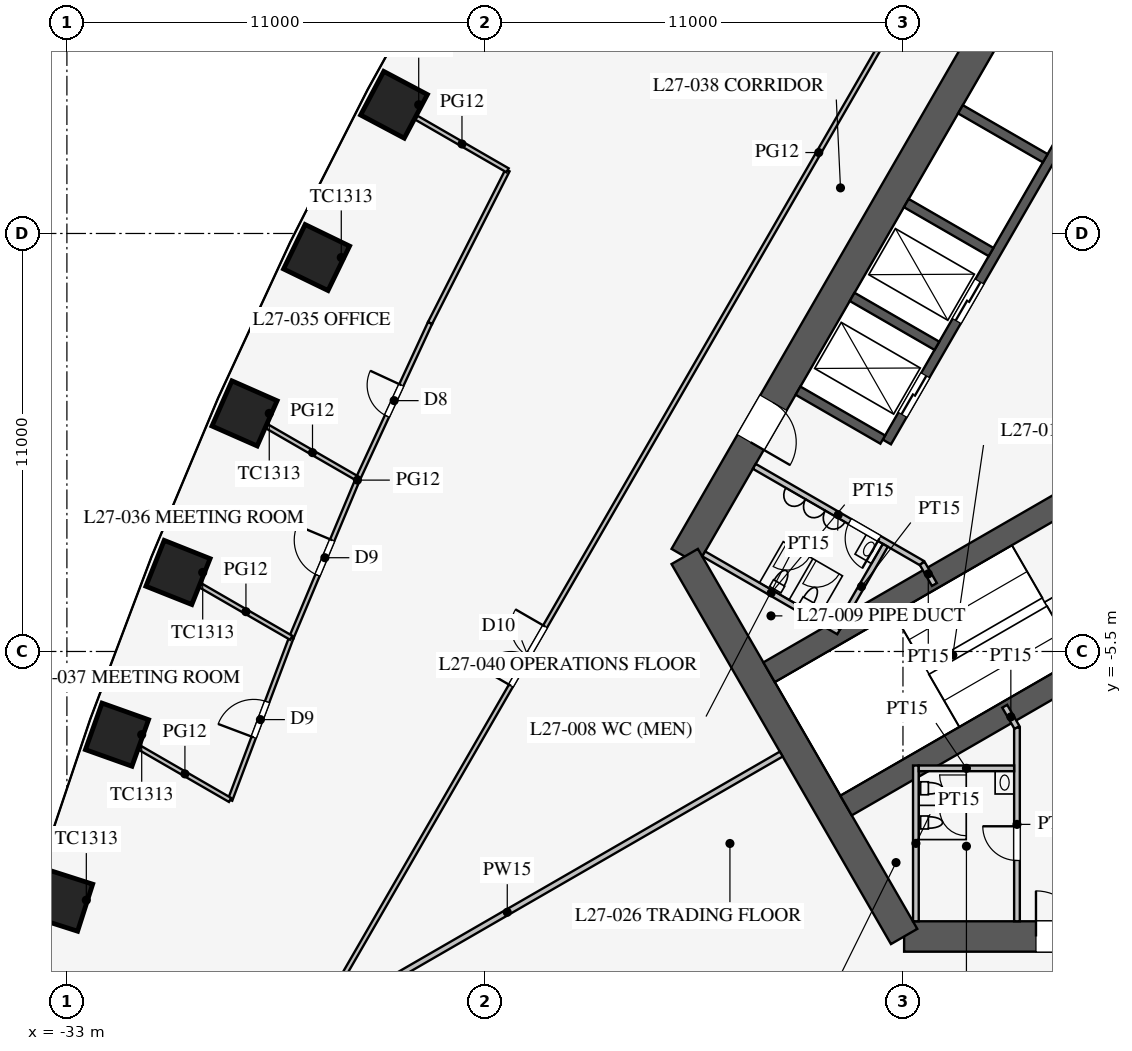
"""IFC4 building model, lengths in metres.
Left out: names, types, materials, properties, quantities, classifications, styles, units other than length and angle.
Written with IfcOpenShell. Run it as: python <this file> out.ifc"""

import sys

from ifc_helpers import new_model, si_unit, direction, frame, frame_2d, origin, origin_2d, place, context, subcontext, project, spatial, rectangle, extrude, element, fill, save


model = new_model("IFC4")
c1 = context("Model", 3, precision=1e-05, world=origin(), true_north=direction((0.0, 1.0)))
c2 = subcontext(c1, "Body", "Model", "MODEL_VIEW")
j1 = project(units=[si_unit("LENGTHUNIT", "METRE"), si_unit("PLANEANGLEUNIT", "RADIAN")], contexts=[c1])
p1 = place(None, origin())
s1 = spatial("IfcSite", under=j1, at=p1, CompositionType="ELEMENT")
p2 = place(p1, origin())
s2 = spatial("IfcBuilding", under=s1, at=p2, CompositionType="ELEMENT")
p3 = place(p2, frame((0.0, 0.0, 119.9)))
s3 = spatial("IfcBuildingStorey", under=s2, at=p3, CompositionType="ELEMENT", Elevation=119.9)
for number, where, z_axis, x_axis in (
    (1, (-24.393, 8.887, 0.0), (0.0, 0.0, 1.0), (-0.468, -0.883, 0.0)),
    (2, (-26.43, 4.867, 0.0), (0.0, 0.0, 1.0), (-0.436, -0.9, 0.0)),
    (3, (-28.325, 0.765, 0.0), (0.0, 0.0, 1.0), (-0.403, -0.915, 0.0)),
    (4, (-30.077, -3.42, 0.0), (0.0, 0.0, 1.0), (-0.37, -0.929, 0.0)),
    (5, (-31.682, -7.689, 0.0), (0.0, 0.0, 1.0), (-0.336, -0.942, 0.0)),
    (6, (-33.139, -12.044, 0.0), (0.0, 0.0, 1.0), (-0.305, -0.952, 0.0)),
):
    element("IfcColumn", number, at=place(p3, frame(where, z_axis=z_axis, x_axis=x_axis)), inside=s3, PredefinedType="COLUMN", context=c2, shape_type="SweptSolid", body=[
        extrude(rectangle(XDim=1.3, YDim=1.3, at=origin_2d()), origin(), (0.0, 0.0, 1.0), 4.2),
    ])
p4 = place(p3, frame((-10.97, -13.0, 0.0), z_axis=(0.0, 0.0, 1.0), x_axis=(1.0, 0.0, 0.0)))
e7 = element("IfcWall", 7, at=p4, inside=s3, PredefinedType="SHEAR", context=c2, shape_type="SweptSolid", body=[
    extrude(rectangle(XDim=21.939, YDim=0.8, at=frame_2d((10.97, 0.0))), origin(), (0.0, 0.0, 1.0), 4.2),
])
p5 = place(p4, frame((17.27, 0.0, 0.0)))
e8 = element("IfcOpeningElement", 8, at=p5, cuts=e7, PredefinedType="OPENING", context=c2, shape_type="SweptSolid", body=[
    extrude(rectangle(XDim=1.2, YDim=2.1, at=frame_2d((0.6, 1.05))), frame((0.0, 0.41, 0.0), z_axis=(0.0, -1.0, 0.0), x_axis=(1.0, 0.0, 0.0)), (0.0, 0.0, 1.0), 0.82),
])
p6 = place(p4, frame((3.47, 0.0, 0.0)))
e9 = element("IfcOpeningElement", 9, at=p6, cuts=e7, PredefinedType="OPENING", context=c2, shape_type="SweptSolid", body=[
    extrude(rectangle(XDim=1.2, YDim=2.1, at=frame_2d((0.6, 1.05))), frame((0.0, 0.41, 0.0), z_axis=(0.0, -1.0, 0.0), x_axis=(1.0, 0.0, 0.0)), (0.0, 0.0, 1.0), 0.82),
])
p7 = place(p3, frame((-5.773, 16.0, 0.0), z_axis=(0.0, 0.0, 1.0), x_axis=(-0.500002442456, -0.866023993627, 0.0)))
e10 = element("IfcWall", 10, at=p7, inside=s3, PredefinedType="SHEAR", context=c2, shape_type="SweptSolid", body=[
    extrude(rectangle(XDim=21.939, YDim=0.8, at=frame_2d((10.97, 0.0))), origin(), (0.0, 0.0, 1.0), 4.2),
])
p8 = place(p7, frame((17.27, 0.0, 0.0)))
e11 = element("IfcOpeningElement", 11, at=p8, cuts=e10, PredefinedType="OPENING", context=c2, shape_type="SweptSolid", body=[
    extrude(rectangle(XDim=1.2, YDim=2.1, at=frame_2d((0.6, 1.05))), frame((0.0, 0.41, 0.0), z_axis=(0.0, -1.0, 0.0), x_axis=(1.0, 0.0, 0.0)), (0.0, 0.0, 1.0), 0.82),
])
p9 = place(p7, frame((3.47, 0.0, 0.0)))
e12 = element("IfcOpeningElement", 12, at=p9, cuts=e10, PredefinedType="OPENING", context=c2, shape_type="SweptSolid", body=[
    extrude(rectangle(XDim=1.2, YDim=2.1, at=frame_2d((0.6, 1.05))), frame((0.0, 0.41, 0.0), z_axis=(0.0, -1.0, 0.0), x_axis=(1.0, 0.0, 0.0)), (0.0, 0.0, 1.0), 0.82),
])
p10 = place(p3, frame((-16.743, -3.0, 0.0), z_axis=(0.0, 0.0, 1.0), x_axis=(0.499995765644, -0.866027848477, 0.0)))
e13 = element("IfcWall", 13, at=p10, inside=s3, PredefinedType="SHEAR", context=c2, shape_type="SweptSolid", body=[
    extrude(rectangle(XDim=11.547, YDim=0.8, at=frame_2d((5.773, 0.0))), origin(), (0.0, 0.0, 1.0), 4.2),
])
p11 = place(p3, frame((-5.724, 9.886, 0.0), z_axis=(0.0, 0.0, 1.0), x_axis=(-0.500001763848, -0.866024385424, 0.0)))
e14 = element("IfcWall", 14, at=p11, inside=s3, PredefinedType="SHEAR", context=c2, shape_type="SweptSolid", body=[
    extrude(rectangle(XDim=11.4, YDim=0.25, at=frame_2d((5.7, 0.0))), origin(), (0.0, 0.0, 1.0), 4.2),
])
p12 = place(p11, frame((6.525, 0.0, 0.0)))
e15 = element("IfcOpeningElement", 15, at=p12, cuts=e14, PredefinedType="OPENING", context=c2, shape_type="SweptSolid", body=[
    extrude(rectangle(XDim=1.2, YDim=2.2, at=frame_2d((0.6, 1.1))), frame((0.0, 0.135, 0.0), z_axis=(0.0, -1.0, 0.0), x_axis=(1.0, 0.0, 0.0)), (0.0, 0.0, 1.0), 0.27),
])
p13 = place(p11, frame((9.375, 0.0, 0.0)))
e16 = element("IfcOpeningElement", 16, at=p13, cuts=e14, PredefinedType="OPENING", context=c2, shape_type="SweptSolid", body=[
    extrude(rectangle(XDim=1.2, YDim=2.2, at=frame_2d((0.6, 1.1))), frame((0.0, 0.135, 0.0), z_axis=(0.0, -1.0, 0.0), x_axis=(1.0, 0.0, 0.0)), (0.0, 0.0, 1.0), 0.27),
])
p14 = place(p3, frame((-5.832, 9.949, 0.0), z_axis=(0.0, 0.0, 1.0), x_axis=(-0.866029291668, 0.499993265928, 0.0)))
e17 = element("IfcWall", 17, at=p14, inside=s3, PredefinedType="SHEAR", context=c2, shape_type="SweptSolid", body=[
    extrude(rectangle(XDim=2.575, YDim=0.25, at=frame_2d((1.288, 0.0))), origin(), (0.0, 0.0, 1.0), 4.2),
])
for number, where, z_axis, x_axis in (
    (18, (-7.257, 7.481, 0.0), (0.0, 0.0, 1.0), (-0.866, 0.5, 0.0)),
    (19, (-8.682, 5.012, 0.0), (0.0, 0.0, 1.0), (-0.866, 0.5, 0.0)),
    (20, (-10.107, 2.544, 0.0), (0.0, 0.0, 1.0), (-0.866, 0.5, 0.0)),
    (21, (-11.532, 0.076, 0.0), (0.0, 0.0, 1.0), (-0.866, 0.5, 0.0)),
):
    element("IfcWall", number, at=place(p3, frame(where, z_axis=z_axis, x_axis=x_axis)), inside=s3, PredefinedType="SHEAR", context=c2, shape_type="SweptSolid", body=[
        extrude(rectangle(XDim=2.575, YDim=0.25, at=frame_2d((1.288, 0.0))), origin(), (0.0, 0.0, 1.0), 4.2),
    ])
for number, where, z_axis, x_axis in (
    (22, (-6.663, -1.509, 0.0), (0.0, 0.0, 1.0), (-0.866, -0.5, 0.0)),
    (23, (-4.638, -5.016, 0.0), (0.0, 0.0, 1.0), (-0.866, -0.5, 0.0)),
):
    element("IfcWall", number, at=place(p3, frame(where, z_axis=z_axis, x_axis=x_axis)), inside=s3, PredefinedType="SHEAR", context=c2, shape_type="SweptSolid", body=[
        extrude(rectangle(XDim=9.075, YDim=0.6, at=frame_2d((4.538, 0.0))), origin(), (0.0, 0.0, 1.0), 4.2),
    ])
p15 = place(p3, frame((-8.0, -7.5, 0.0), z_axis=(0.0, 0.0, 1.0), x_axis=(0.0, -1.0, 0.0)))
e24 = element("IfcWall", 24, at=p15, inside=s3, PredefinedType="PARTITIONING", context=c2, shape_type="SweptSolid", body=[
    extrude(rectangle(XDim=5.1, YDim=0.15, at=frame_2d((2.55, 0.0))), origin(), (0.0, 0.0, 1.0), 4.0),
])
p16 = place(p15, frame((2.6, 0.0, 0.0)))
e25 = element("IfcOpeningElement", 25, at=p16, cuts=e24, PredefinedType="OPENING", context=c2, shape_type="SweptSolid", body=[
    extrude(rectangle(XDim=0.9, YDim=2.1, at=frame_2d((0.45, 1.05))), frame((0.0, 0.085, 0.0), z_axis=(0.0, -1.0, 0.0), x_axis=(1.0, 0.0, 0.0)), (0.0, 0.0, 1.0), 0.17),
])
p17 = place(p3, frame((-10.495, -3.178, 0.0), z_axis=(0.0, 0.0, 1.0), x_axis=(-0.86602216432, 0.500005610874, 0.0)))
e26 = element("IfcWall", 26, at=p17, inside=s3, PredefinedType="PARTITIONING", context=c2, shape_type="SweptSolid", body=[
    extrude(rectangle(XDim=5.1, YDim=0.15, at=frame_2d((2.55, 0.0))), origin(), (0.0, 0.0, 1.0), 4.0),
])
p18 = place(p17, frame((1.3, 0.0, 0.0)))
e27 = element("IfcOpeningElement", 27, at=p18, cuts=e26, PredefinedType="OPENING", context=c2, shape_type="SweptSolid", body=[
    extrude(rectangle(XDim=0.9, YDim=2.1, at=frame_2d((0.45, 1.05))), frame((0.0, 0.085, 0.0), z_axis=(0.0, -1.0, 0.0), x_axis=(1.0, 0.0, 0.0)), (0.0, 0.0, 1.0), 0.17),
])
for number, where, z_axis, x_axis in (
    (28, (-10.495, -3.178, 0.0), (0.0, 0.0, 1.0), (0.5, -0.866, 0.0)),
    (29, (-8.0, -7.5, 0.0), (0.0, 0.0, 1.0), (-0.5, 0.866, 0.0)),
):
    element("IfcWall", number, at=place(p3, frame(where, z_axis=z_axis, x_axis=x_axis)), inside=s3, PredefinedType="PARTITIONING", context=c2, shape_type="SweptSolid", body=[
        extrude(rectangle(XDim=0.645, YDim=0.15, at=frame_2d((0.323, 0.0))), origin(), (0.0, 0.0, 1.0), 4.0),
    ])
p19 = place(p3, frame((-12.691, -4.982, 0.0), z_axis=(0.0, 0.0, 1.0), x_axis=(-0.8660249478, 0.500000789788, 0.0)))
e30 = element("IfcWall", 30, at=p19, inside=s3, PredefinedType="PARTITIONING", context=c2, shape_type="SweptSolid", body=[
    extrude(rectangle(XDim=4.1, YDim=0.15, at=frame_2d((2.05, 0.0))), origin(), (0.0, 0.0, 1.0), 4.0),
])
p20 = place(p3, frame((-11.464, -2.706, 0.0), z_axis=(0.0, 0.0, 1.0), x_axis=(-0.50001992892, -0.866013897511, 0.0)))
e31 = element("IfcWall", 31, at=p20, inside=s3, PredefinedType="PARTITIONING", context=c2, shape_type="SweptSolid", body=[
    extrude(rectangle(XDim=2.51, YDim=0.15, at=frame_2d((1.255, 0.0))), origin(), (0.0, 0.0, 1.0), 4.0),
])
p21 = place(p3, frame((-10.66, -8.5, 0.0), z_axis=(0.0, 0.0, 1.0), x_axis=(0.0, -1.0, 0.0)))
e32 = element("IfcWall", 32, at=p21, inside=s3, PredefinedType="PARTITIONING", context=c2, shape_type="SweptSolid", body=[
    extrude(rectangle(XDim=4.1, YDim=0.15, at=frame_2d((2.05, 0.0))), origin(), (0.0, 0.0, 1.0), 4.0),
])
p22 = place(p3, frame((-8.075, -8.575, 0.0), z_axis=(0.0, 0.0, 1.0), x_axis=(-1.0, 0.0, 0.0)))
e33 = element("IfcWall", 33, at=p22, inside=s3, PredefinedType="PARTITIONING", context=c2, shape_type="SweptSolid", body=[
    extrude(rectangle(XDim=2.51, YDim=0.15, at=frame_2d((1.255, 0.0))), origin(), (0.0, 0.0, 1.0), 4.0),
])
p23 = place(p3, frame((-14.203, -8.2, 0.0), z_axis=(0.0, 0.0, 1.0), x_axis=(-0.866024668836, -0.500001272966, 0.0)))
e34 = element("IfcWall", 34, at=p23, inside=s3, PredefinedType="PARTITIONING", context=c2, shape_type="SweptSolid", body=[
    extrude(rectangle(XDim=16.65, YDim=0.15, at=frame_2d((8.325, 0.0))), origin(), (0.0, 0.0, 1.0), 2.3),
])
p24 = place(p3, frame((-0.016, 30.491, 0.0), z_axis=(0.0, 0.0, 1.0), x_axis=(-0.50000091641, -0.866024874695, 0.0)))
e35 = element("IfcWall", 35, at=p24, inside=s3, PredefinedType="PARTITIONING", context=c2, shape_type="SweptSolid", body=[
    extrude(rectangle(XDim=52.796, YDim=0.12, at=frame_2d((26.398, 0.0))), origin(), (0.0, 0.0, 1.0), 2.9),
])
p25 = place(p24, frame((10.2, 0.0, 0.15)))
e36 = element("IfcOpeningElement", 36, at=p25, cuts=e35, PredefinedType="OPENING", context=c2, shape_type="SweptSolid", body=[
    extrude(rectangle(XDim=1.8, YDim=2.1, at=frame_2d((0.9, 1.05))), frame((0.0, 0.07, 0.0), z_axis=(0.0, -1.0, 0.0), x_axis=(1.0, 0.0, 0.0)), (0.0, 0.0, 1.0), 0.14),
])
p26 = place(p24, frame((40.8, 0.0, 0.15)))
e37 = element("IfcOpeningElement", 37, at=p26, cuts=e35, PredefinedType="OPENING", context=c2, shape_type="SweptSolid", body=[
    extrude(rectangle(XDim=1.8, YDim=2.1, at=frame_2d((0.9, 1.05))), frame((0.0, 0.07, 0.0), z_axis=(0.0, -1.0, 0.0), x_axis=(1.0, 0.0, 0.0)), (0.0, 0.0, 1.0), 0.14),
])
p27 = place(p3, frame((-25.342, -0.958, 0.0), z_axis=(0.0, 0.0, 1.0), x_axis=(-0.386807881778, -0.922160323693, 0.0)))
e38 = element("IfcWall", 38, at=p27, inside=s3, PredefinedType="PARTITIONING", context=c2, shape_type="SweptSolid", body=[
    extrude(rectangle(XDim=4.536, YDim=0.12, at=frame_2d((2.268, 0.0))), origin(), (0.0, 0.0, 1.0), 2.9),
])
p28 = place(p27, frame((1.75, 0.0, 0.15)))
e39 = element("IfcOpeningElement", 39, at=p28, cuts=e38, PredefinedType="OPENING", context=c2, shape_type="SweptSolid", body=[
    extrude(rectangle(XDim=1.0, YDim=2.1, at=frame_2d((0.5, 1.05))), frame((0.0, 0.07, 0.0), z_axis=(0.0, -1.0, 0.0), x_axis=(1.0, 0.0, 0.0)), (0.0, 0.0, 1.0), 0.14),
])
p29 = place(p3, frame((-27.096, -5.141, 0.0), z_axis=(0.0, 0.0, 1.0), x_axis=(-0.352894560512, -0.93566309597, 0.0)))
e40 = element("IfcWall", 40, at=p29, inside=s3, PredefinedType="PARTITIONING", context=c2, shape_type="SweptSolid", body=[
    extrude(rectangle(XDim=4.561, YDim=0.12, at=frame_2d((2.28, 0.0))), origin(), (0.0, 0.0, 1.0), 2.9),
])
p30 = place(p29, frame((1.8, 0.0, 0.15)))
e41 = element("IfcOpeningElement", 41, at=p30, cuts=e40, PredefinedType="OPENING", context=c2, shape_type="SweptSolid", body=[
    extrude(rectangle(XDim=1.0, YDim=2.1, at=frame_2d((0.5, 1.05))), frame((0.0, 0.07, 0.0), z_axis=(0.0, -1.0, 0.0), x_axis=(1.0, 0.0, 0.0)), (0.0, 0.0, 1.0), 0.14),
])
p31 = place(p3, frame((-21.405, 7.162, 0.0), z_axis=(0.0, 0.0, 1.0), x_axis=(-0.452471679136, -0.891778772779, 0.0)))
e42 = element("IfcWall", 42, at=p31, inside=s3, PredefinedType="PARTITIONING", context=c2, shape_type="SweptSolid", body=[
    extrude(rectangle(XDim=4.507, YDim=0.12, at=frame_2d((2.253, 0.0))), origin(), (0.0, 0.0, 1.0), 2.9),
])
p32 = place(p3, frame((-23.444, 3.143, 0.0), z_axis=(0.0, 0.0, 1.0), x_axis=(-0.419883773418, -0.907577884713, 0.0)))
e43 = element("IfcWall", 43, at=p32, inside=s3, PredefinedType="PARTITIONING", context=c2, shape_type="SweptSolid", body=[
    extrude(rectangle(XDim=4.519, YDim=0.12, at=frame_2d((2.259, 0.0))), origin(), (0.0, 0.0, 1.0), 2.9),
])
p33 = place(p32, frame((1.8, 0.0, 0.15)))
e44 = element("IfcOpeningElement", 44, at=p33, cuts=e43, PredefinedType="OPENING", context=c2, shape_type="SweptSolid", body=[
    extrude(rectangle(XDim=0.9, YDim=2.1, at=frame_2d((0.45, 1.05))), frame((0.0, 0.07, 0.0), z_axis=(0.0, -1.0, 0.0), x_axis=(1.0, 0.0, 0.0)), (0.0, 0.0, 1.0), 0.14),
])
p34 = place(p3, frame((-25.342, -0.958, 0.0), z_axis=(0.0, 0.0, 1.0), x_axis=(-0.866014808974, 0.500018350302, 0.0)))
e45 = element("IfcWall", 45, at=p34, inside=s3, PredefinedType="PARTITIONING", context=c2, shape_type="SweptSolid", body=[
    extrude(rectangle(XDim=2.762, YDim=0.12, at=frame_2d((1.381, 0.0))), origin(), (0.0, 0.0, 1.0), 2.9),
])
p35 = place(p3, frame((-27.096, -5.141, 0.0), z_axis=(0.0, 0.0, 1.0), x_axis=(-0.866014354455, 0.500019137511, 0.0)))
e46 = element("IfcWall", 46, at=p35, inside=s3, PredefinedType="PARTITIONING", context=c2, shape_type="SweptSolid", body=[
    extrude(rectangle(XDim=2.754, YDim=0.12, at=frame_2d((1.377, 0.0))), origin(), (0.0, 0.0, 1.0), 2.9),
])
p36 = place(p3, frame((-28.706, -9.408, 0.0), z_axis=(0.0, 0.0, 1.0), x_axis=(-0.866018252288, 0.500012386551, 0.0)))
e47 = element("IfcWall", 47, at=p36, inside=s3, PredefinedType="PARTITIONING", context=c2, shape_type="SweptSolid", body=[
    extrude(rectangle(XDim=2.746, YDim=0.12, at=frame_2d((1.373, 0.0))), origin(), (0.0, 0.0, 1.0), 2.9),
])
p37 = place(p3, frame((-21.405, 7.162, 0.0), z_axis=(0.0, 0.0, 1.0), x_axis=(-0.866015261085, 0.500017567259, 0.0)))
e48 = element("IfcWall", 48, at=p37, inside=s3, PredefinedType="PARTITIONING", context=c2, shape_type="SweptSolid", body=[
    extrude(rectangle(XDim=2.769, YDim=0.12, at=frame_2d((1.385, 0.0))), origin(), (0.0, 0.0, 1.0), 2.9),
])
p38 = place(p16, frame((0.9, 0.0, 0.0), z_axis=(0.0, 0.0, 1.0), x_axis=(-1.0, 0.0, 0.0)))
e49 = element("IfcDoor", 49, at=p38, inside=s3, OperationType="SINGLE_SWING_RIGHT", PredefinedType="DOOR", context=c2, shape_type="SweptSolid", body=[
    extrude(rectangle(XDim=0.9, YDim=2.1, at=frame_2d((0.45, 1.05))), frame((0.0, 0.025, 0.0), z_axis=(0.0, -1.0, 0.0), x_axis=(1.0, 0.0, 0.0)), (0.0, 0.0, 1.0), 0.05),
])
fill(e25, e49)
p39 = place(p18, origin())
e50 = element("IfcDoor", 50, at=p39, inside=s3, OperationType="SINGLE_SWING_LEFT", PredefinedType="DOOR", context=c2, shape_type="SweptSolid", body=[
    extrude(rectangle(XDim=0.9, YDim=2.1, at=frame_2d((0.45, 1.05))), frame((0.0, 0.025, 0.0), z_axis=(0.0, -1.0, 0.0), x_axis=(1.0, 0.0, 0.0)), (0.0, 0.0, 1.0), 0.05),
])
fill(e27, e50)
p40 = place(p6, origin())
e51 = element("IfcDoor", 51, at=p40, inside=s3, OperationType="SINGLE_SWING_LEFT", PredefinedType="DOOR", context=c2, shape_type="SweptSolid", body=[
    extrude(rectangle(XDim=1.2, YDim=2.1, at=frame_2d((0.6, 1.05))), frame((0.0, 0.025, 0.0), z_axis=(0.0, -1.0, 0.0), x_axis=(1.0, 0.0, 0.0)), (0.0, 0.0, 1.0), 0.05),
])
fill(e9, e51)
p41 = place(p8, origin())
e52 = element("IfcDoor", 52, at=p41, inside=s3, OperationType="SINGLE_SWING_RIGHT", PredefinedType="DOOR", context=c2, shape_type="SweptSolid", body=[
    extrude(rectangle(XDim=1.2, YDim=2.1, at=frame_2d((0.6, 1.05))), frame((0.0, 0.025, 0.0), z_axis=(0.0, -1.0, 0.0), x_axis=(1.0, 0.0, 0.0)), (0.0, 0.0, 1.0), 0.05),
])
fill(e11, e52)
p42 = place(p33, frame((0.9, 0.0, 0.0), z_axis=(0.0, 0.0, 1.0), x_axis=(-1.0, 0.0, 0.0)))
e53 = element("IfcDoor", 53, at=p42, inside=s3, OperationType="SINGLE_SWING_RIGHT", PredefinedType="DOOR", context=c2, shape_type="SweptSolid", body=[
    extrude(rectangle(XDim=0.9, YDim=2.1, at=frame_2d((0.45, 1.05))), frame((0.0, 0.025, 0.0), z_axis=(0.0, -1.0, 0.0), x_axis=(1.0, 0.0, 0.0)), (0.0, 0.0, 1.0), 0.05),
])
fill(e44, e53)
p43 = place(p28, frame((1.0, 0.0, 0.0), z_axis=(0.0, 0.0, 1.0), x_axis=(-1.0, 0.0, 0.0)))
e54 = element("IfcDoor", 54, at=p43, inside=s3, OperationType="SINGLE_SWING_RIGHT", PredefinedType="DOOR", context=c2, shape_type="SweptSolid", body=[
    extrude(rectangle(XDim=1.0, YDim=2.1, at=frame_2d((0.5, 1.05))), frame((0.0, 0.025, 0.0), z_axis=(0.0, -1.0, 0.0), x_axis=(1.0, 0.0, 0.0)), (0.0, 0.0, 1.0), 0.05),
])
fill(e39, e54)
p44 = place(p30, frame((1.0, 0.0, 0.0), z_axis=(0.0, 0.0, 1.0), x_axis=(-1.0, 0.0, 0.0)))
e55 = element("IfcDoor", 55, at=p44, inside=s3, OperationType="SINGLE_SWING_LEFT", PredefinedType="DOOR", context=c2, shape_type="SweptSolid", body=[
    extrude(rectangle(XDim=1.0, YDim=2.1, at=frame_2d((0.5, 1.05))), frame((0.0, 0.025, 0.0), z_axis=(0.0, -1.0, 0.0), x_axis=(1.0, 0.0, 0.0)), (0.0, 0.0, 1.0), 0.05),
])
fill(e41, e55)
p45 = place(p26, frame((1.8, 0.0, 0.0), z_axis=(0.0, 0.0, 1.0), x_axis=(-1.0, 0.0, 0.0)))
e56 = element("IfcDoor", 56, at=p45, inside=s3, OperationType="DOUBLE_DOOR_SINGLE_SWING", PredefinedType="DOOR", context=c2, shape_type="SweptSolid", body=[
    extrude(rectangle(XDim=1.8, YDim=2.1, at=frame_2d((0.9, 1.05))), frame((0.0, 0.025, 0.0), z_axis=(0.0, -1.0, 0.0), x_axis=(1.0, 0.0, 0.0)), (0.0, 0.0, 1.0), 0.05),
])
fill(e37, e56)
p46 = place(p12, origin())
e57 = element("IfcDoor", 57, at=p46, inside=s3, OperationType="DOUBLE_DOOR_SLIDING", PredefinedType="DOOR", context=c2, shape_type="SweptSolid", body=[
    extrude(rectangle(XDim=1.2, YDim=2.2, at=frame_2d((0.6, 1.1))), frame((0.0, 0.025, 0.0), z_axis=(0.0, -1.0, 0.0), x_axis=(1.0, 0.0, 0.0)), (0.0, 0.0, 1.0), 0.05),
])
fill(e15, e57)
p47 = place(p13, origin())
e58 = element("IfcDoor", 58, at=p47, inside=s3, OperationType="DOUBLE_DOOR_SLIDING", PredefinedType="DOOR", context=c2, shape_type="SweptSolid", body=[
    extrude(rectangle(XDim=1.2, YDim=2.2, at=frame_2d((0.6, 1.1))), frame((0.0, 0.025, 0.0), z_axis=(0.0, -1.0, 0.0), x_axis=(1.0, 0.0, 0.0)), (0.0, 0.0, 1.0), 0.05),
])
fill(e16, e58)
save(model, sys.argv[1])
